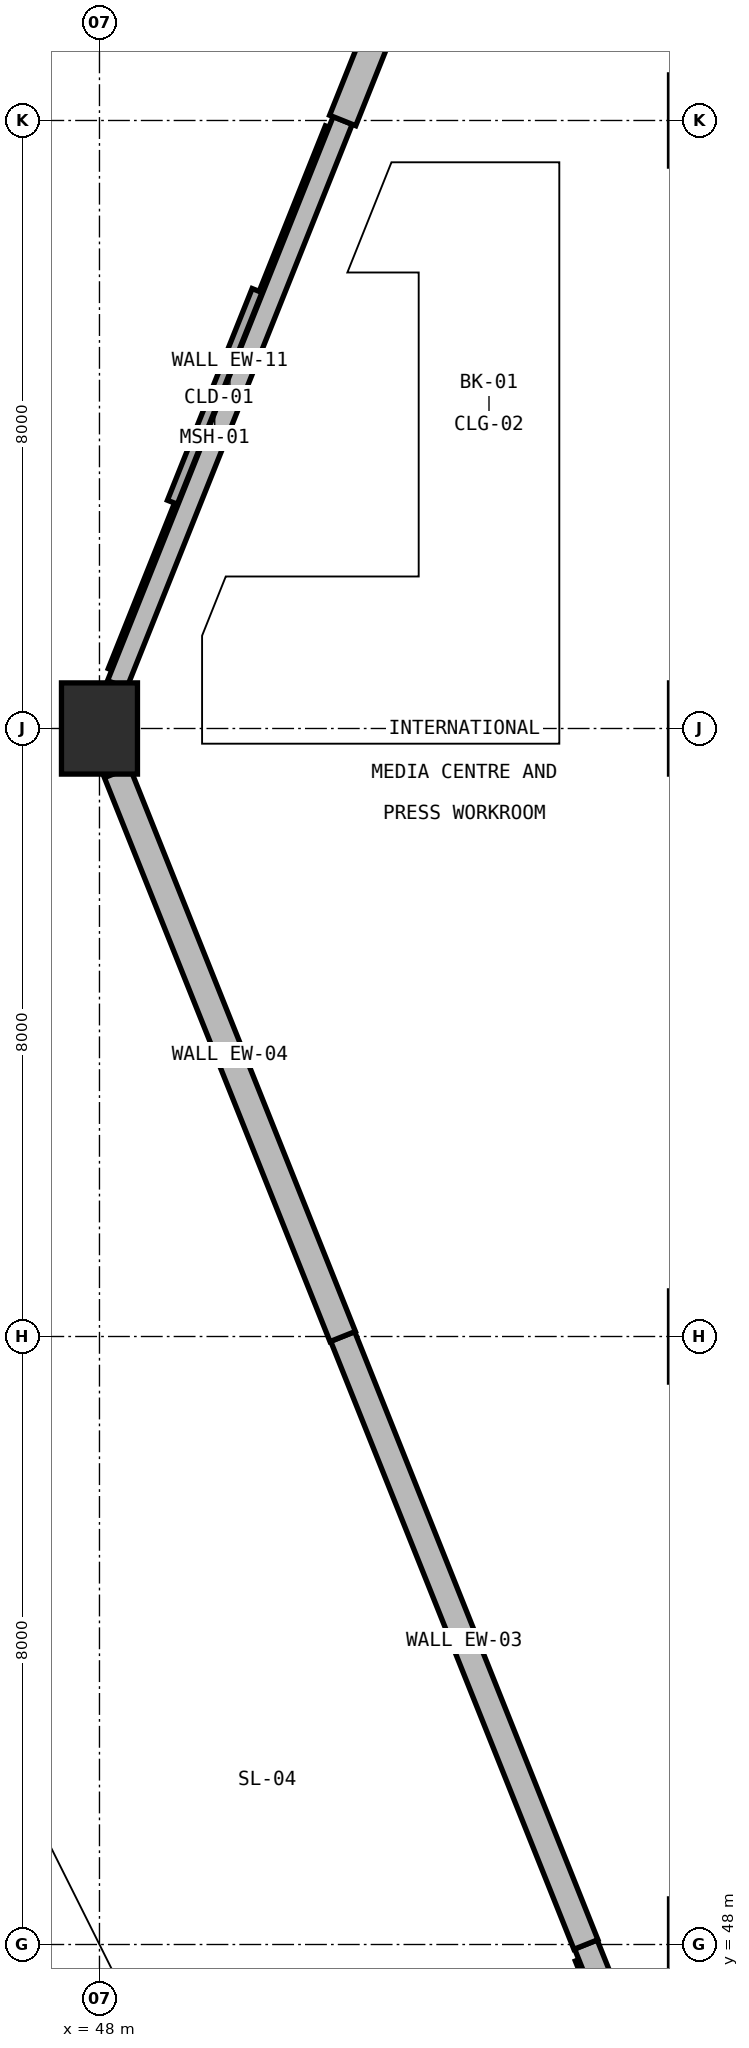
"""IFC4 building model, lengths in metres.
Left out: names, types, materials, properties, quantities, classifications, styles, units other than length and angle.
Written with IfcOpenShell. Run it as: python <this file> out.ifc"""

import sys

from ifc_helpers import new_model, si_unit, direction, frame, frame_2d, origin, origin_2d, place, context, subcontext, project, spatial, rectangle, extrude, element, save


model = new_model("IFC4")
c1 = context("Model", 3, precision=1e-05, world=origin(), true_north=direction((0.0, 1.0)))
c2 = subcontext(c1, "Body", "Model", "MODEL_VIEW")
j1 = project(units=[si_unit("LENGTHUNIT", "METRE"), si_unit("PLANEANGLEUNIT", "RADIAN")], contexts=[c1])
p1 = place(None, origin())
s1 = spatial("IfcSite", under=j1, at=p1, CompositionType="ELEMENT")
p2 = place(p1, origin())
s2 = spatial("IfcBuilding", under=s1, at=p2, CompositionType="ELEMENT")
p3 = place(p2, frame((0.0, 0.0, 19.8)))
s3 = spatial("IfcBuildingStorey", under=s2, at=p3, CompositionType="ELEMENT", Elevation=19.8)
p4 = place(p3, frame((48.0, 64.0, 0.0), z_axis=(0.0, 0.0, 1.0), x_axis=(1.0, 0.0, 0.0)))
e1 = element("IfcColumn", 1, at=p4, inside=s3, PredefinedType="COLUMN", context=c2, shape_type="SweptSolid", body=[
    extrude(rectangle(XDim=1.0, YDim=1.2, at=origin_2d()), origin(), (0.0, 0.0, 1.0), 4.8),
])
p5 = place(p3, frame((48.232, 64.58, 0.0), z_axis=(0.0, 0.0, 1.0), x_axis=(0.371395943584, 0.928474583976, 0.0)))
e2 = element("IfcWall", 2, at=p5, inside=s3, PredefinedType="SOLIDWALL", context=c2, shape_type="SweptSolid", body=[
    extrude(rectangle(XDim=7.991, YDim=0.27, at=frame_2d((3.996, 0.0))), origin(), (0.0, 0.0, 1.0), 3.45),
])
p6 = place(p3, frame((51.2, 72.0, 0.0), z_axis=(0.0, 0.0, 1.0), x_axis=(0.371385791018, 0.928478645005, 0.0)))
e3 = element("IfcWall", 3, at=p6, inside=s3, PredefinedType="SOLIDWALL", context=c2, shape_type="SweptSolid", body=[
    extrude(rectangle(XDim=8.616, YDim=0.37, at=frame_2d((4.308, 0.0))), origin(), (0.0, 0.0, 1.0), 3.45),
])
p7 = place(p3, frame((57.6, 40.0, 0.0), z_axis=(0.0, 0.0, 1.0), x_axis=(-0.37141021739, 0.928468874232, 0.0)))
e4 = element("IfcWall", 4, at=p7, inside=s3, PredefinedType="SOLIDWALL", context=c2, shape_type="SweptSolid", body=[
    extrude(rectangle(XDim=8.616, YDim=0.32, at=frame_2d((4.308, 0.0))), origin(), (0.0, 0.0, 1.0), 3.45),
])
p8 = place(p3, frame((54.4, 48.0, 0.0), z_axis=(0.0, 0.0, 1.0), x_axis=(-0.371385791018, 0.928478645005, 0.0)))
e5 = element("IfcWall", 5, at=p8, inside=s3, PredefinedType="SOLIDWALL", context=c2, shape_type="SweptSolid", body=[
    extrude(rectangle(XDim=8.616, YDim=0.34, at=frame_2d((4.308, 0.0))), origin(), (0.0, 0.0, 1.0), 3.45),
])
p9 = place(p3, frame((51.2, 56.0, 0.0), z_axis=(0.0, 0.0, 1.0), x_axis=(-0.371395943584, 0.928474583976, 0.0)))
e6 = element("IfcWall", 6, at=p9, inside=s3, PredefinedType="SOLIDWALL", context=c2, shape_type="SweptSolid", body=[
    extrude(rectangle(XDim=7.991, YDim=0.36, at=frame_2d((3.996, 0.0))), origin(), (0.0, 0.0, 1.0), 3.45),
])
save(model, sys.argv[1])
